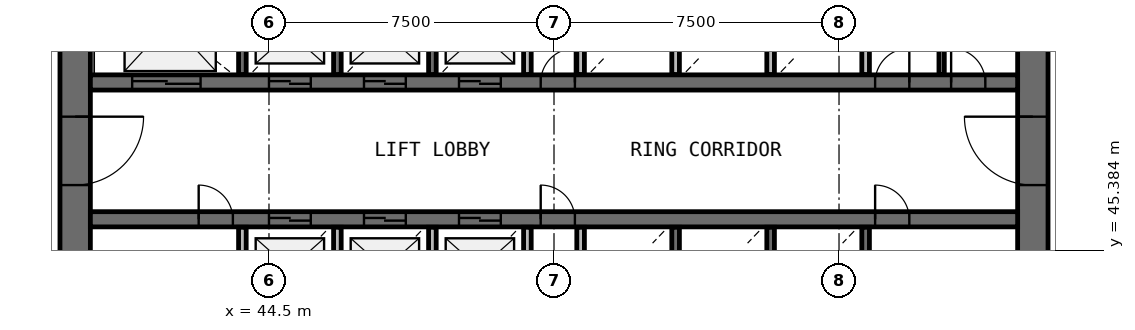
"""IFC4 building model, lengths in metres.
Left out: names, types, materials, properties, quantities, classifications, styles, units other than length and angle.
Written with IfcOpenShell. Run it as: python <this file> out.ifc"""

import sys

from ifc_helpers import new_model, si_unit, direction, frame, frame_2d, origin, place, context, subcontext, project, spatial, rectangle, extrude, source, transform, mapped, element, fill, save


model = new_model("IFC4")
c1 = context("Model", 3, precision=1e-05, world=origin(), true_north=direction((0.0, 1.0)))
c2 = subcontext(c1, "Body", "Model", "MODEL_VIEW")
j1 = project(units=[si_unit("LENGTHUNIT", "METRE"), si_unit("PLANEANGLEUNIT", "RADIAN")], contexts=[c1])
p1 = place(None, origin())
s1 = spatial("IfcSite", under=j1, at=p1, CompositionType="ELEMENT")
p2 = place(p1, origin())
s2 = spatial("IfcBuilding", under=s1, at=p2, CompositionType="ELEMENT")
p3 = place(p2, frame((0.0, 0.0, 112.6)))
s3 = spatial("IfcBuildingStorey", under=s2, at=p3, CompositionType="ELEMENT", Elevation=112.6)
p4 = place(p3, frame((64.6, 38.0, 0.0), z_axis=(0.0, 0.0, 1.0), x_axis=(0.0, 1.0, 0.0)))
e1 = element("IfcWall", 1, at=p4, inside=s3, PredefinedType="SHEAR", context=c2, shape_type="SweptSolid", body=[
    extrude(rectangle(XDim=20.0, YDim=0.8, at=frame_2d((10.0, 0.0))), origin(), (0.0, 0.0, 1.0), 4.1),
])
p5 = place(p4, frame((9.1, 0.0, 0.0)))
e2 = element("IfcOpeningElement", 2, at=p5, cuts=e1, PredefinedType="OPENING", context=c2, shape_type="SweptSolid", body=[
    extrude(rectangle(XDim=1.8, YDim=2.1, at=frame_2d((0.9, 1.05))), frame((0.0, 0.41, 0.0), z_axis=(0.0, -1.0, 0.0), x_axis=(1.0, 0.0, 0.0)), (0.0, 0.0, 1.0), 0.82),
])
p6 = place(p3, frame((39.4, 58.0, 0.0), z_axis=(0.0, 0.0, 1.0), x_axis=(0.0, -1.0, 0.0)))
e3 = element("IfcWall", 3, at=p6, inside=s3, PredefinedType="SHEAR", context=c2, shape_type="SweptSolid", body=[
    extrude(rectangle(XDim=20.0, YDim=0.8, at=frame_2d((10.0, 0.0))), origin(), (0.0, 0.0, 1.0), 4.1),
])
p7 = place(p6, frame((9.1, 0.0, 0.0)))
e4 = element("IfcOpeningElement", 4, at=p7, cuts=e3, PredefinedType="OPENING", context=c2, shape_type="SweptSolid", body=[
    extrude(rectangle(XDim=1.8, YDim=2.1, at=frame_2d((0.9, 1.05))), frame((0.0, 0.41, 0.0), z_axis=(0.0, -1.0, 0.0), x_axis=(1.0, 0.0, 0.0)), (0.0, 0.0, 1.0), 0.82),
])
p8 = place(p3, frame((39.8, 49.8, 0.0), z_axis=(0.0, 0.0, 1.0), x_axis=(1.0, 0.0, 0.0)))
e5 = element("IfcWall", 5, at=p8, inside=s3, PredefinedType="SHEAR", context=c2, shape_type="SweptSolid", body=[
    extrude(rectangle(XDim=24.4, YDim=0.4, at=frame_2d((12.2, 0.0))), origin(), (0.0, 0.0, 1.0), 4.1),
])
p9 = place(p8, frame((4.7, 0.0, 0.0)))
e6 = element("IfcOpeningElement", 6, at=p9, cuts=e5, PredefinedType="OPENING", context=c2, shape_type="SweptSolid", body=[
    extrude(rectangle(XDim=1.1, YDim=2.1, at=frame_2d((0.55, 1.05))), frame((0.0, 0.21, 0.0), z_axis=(0.0, -1.0, 0.0), x_axis=(1.0, 0.0, 0.0)), (0.0, 0.0, 1.0), 0.42),
])
p10 = place(p8, frame((7.2, 0.0, 0.0)))
e7 = element("IfcOpeningElement", 7, at=p10, cuts=e5, PredefinedType="OPENING", context=c2, shape_type="SweptSolid", body=[
    extrude(rectangle(XDim=1.1, YDim=2.1, at=frame_2d((0.55, 1.05))), frame((0.0, 0.21, 0.0), z_axis=(0.0, -1.0, 0.0), x_axis=(1.0, 0.0, 0.0)), (0.0, 0.0, 1.0), 0.42),
])
p11 = place(p8, frame((9.7, 0.0, 0.0)))
e8 = element("IfcOpeningElement", 8, at=p11, cuts=e5, PredefinedType="OPENING", context=c2, shape_type="SweptSolid", body=[
    extrude(rectangle(XDim=1.1, YDim=2.1, at=frame_2d((0.55, 1.05))), frame((0.0, 0.21, 0.0), z_axis=(0.0, -1.0, 0.0), x_axis=(1.0, 0.0, 0.0)), (0.0, 0.0, 1.0), 0.42),
])
p12 = place(p8, frame((1.1, 0.0, 0.0)))
e9 = element("IfcOpeningElement", 9, at=p12, cuts=e5, PredefinedType="OPENING", context=c2, shape_type="SweptSolid", body=[
    extrude(rectangle(XDim=1.8, YDim=2.4, at=frame_2d((0.9, 1.2))), frame((0.0, 0.21, 0.0), z_axis=(0.0, -1.0, 0.0), x_axis=(1.0, 0.0, 0.0)), (0.0, 0.0, 1.0), 0.42),
])
p13 = place(p8, frame((20.65, 0.0, 0.0)))
e10 = element("IfcOpeningElement", 10, at=p13, cuts=e5, PredefinedType="OPENING", context=c2, shape_type="SweptSolid", body=[
    extrude(rectangle(XDim=0.9, YDim=2.1, at=frame_2d((0.45, 1.05))), frame((0.0, 0.21, 0.0), z_axis=(0.0, -1.0, 0.0), x_axis=(1.0, 0.0, 0.0)), (0.0, 0.0, 1.0), 0.42),
])
p14 = place(p8, frame((22.65, 0.0, 0.0)))
e11 = element("IfcOpeningElement", 11, at=p14, cuts=e5, PredefinedType="OPENING", context=c2, shape_type="SweptSolid", body=[
    extrude(rectangle(XDim=0.9, YDim=2.1, at=frame_2d((0.45, 1.05))), frame((0.0, 0.21, 0.0), z_axis=(0.0, -1.0, 0.0), x_axis=(1.0, 0.0, 0.0)), (0.0, 0.0, 1.0), 0.42),
])
p15 = place(p8, frame((11.85, 0.0, 0.0)))
e12 = element("IfcOpeningElement", 12, at=p15, cuts=e5, PredefinedType="OPENING", context=c2, shape_type="SweptSolid", body=[
    extrude(rectangle(XDim=0.9, YDim=2.1, at=frame_2d((0.45, 1.05))), frame((0.0, 0.21, 0.0), z_axis=(0.0, -1.0, 0.0), x_axis=(1.0, 0.0, 0.0)), (0.0, 0.0, 1.0), 0.42),
])
p16 = place(p3, frame((39.8, 46.2, 0.0), z_axis=(0.0, 0.0, 1.0), x_axis=(1.0, 0.0, 0.0)))
e13 = element("IfcWall", 13, at=p16, inside=s3, PredefinedType="SHEAR", context=c2, shape_type="SweptSolid", body=[
    extrude(rectangle(XDim=24.4, YDim=0.4, at=frame_2d((12.2, 0.0))), origin(), (0.0, 0.0, 1.0), 4.1),
])
p17 = place(p16, frame((4.7, 0.0, 0.0)))
e14 = element("IfcOpeningElement", 14, at=p17, cuts=e13, PredefinedType="OPENING", context=c2, shape_type="SweptSolid", body=[
    extrude(rectangle(XDim=1.1, YDim=2.1, at=frame_2d((0.55, 1.05))), frame((0.0, 0.21, 0.0), z_axis=(0.0, -1.0, 0.0), x_axis=(1.0, 0.0, 0.0)), (0.0, 0.0, 1.0), 0.42),
])
p18 = place(p16, frame((7.2, 0.0, 0.0)))
e15 = element("IfcOpeningElement", 15, at=p18, cuts=e13, PredefinedType="OPENING", context=c2, shape_type="SweptSolid", body=[
    extrude(rectangle(XDim=1.1, YDim=2.1, at=frame_2d((0.55, 1.05))), frame((0.0, 0.21, 0.0), z_axis=(0.0, -1.0, 0.0), x_axis=(1.0, 0.0, 0.0)), (0.0, 0.0, 1.0), 0.42),
])
p19 = place(p16, frame((9.7, 0.0, 0.0)))
e16 = element("IfcOpeningElement", 16, at=p19, cuts=e13, PredefinedType="OPENING", context=c2, shape_type="SweptSolid", body=[
    extrude(rectangle(XDim=1.1, YDim=2.1, at=frame_2d((0.55, 1.05))), frame((0.0, 0.21, 0.0), z_axis=(0.0, -1.0, 0.0), x_axis=(1.0, 0.0, 0.0)), (0.0, 0.0, 1.0), 0.42),
])
p20 = place(p16, frame((20.65, 0.0, 0.0)))
e17 = element("IfcOpeningElement", 17, at=p20, cuts=e13, PredefinedType="OPENING", context=c2, shape_type="SweptSolid", body=[
    extrude(rectangle(XDim=0.9, YDim=2.1, at=frame_2d((0.45, 1.05))), frame((0.0, 0.21, 0.0), z_axis=(0.0, -1.0, 0.0), x_axis=(1.0, 0.0, 0.0)), (0.0, 0.0, 1.0), 0.42),
])
p21 = place(p16, frame((2.85, 0.0, 0.0)))
e18 = element("IfcOpeningElement", 18, at=p21, cuts=e13, PredefinedType="OPENING", context=c2, shape_type="SweptSolid", body=[
    extrude(rectangle(XDim=0.9, YDim=2.1, at=frame_2d((0.45, 1.05))), frame((0.0, 0.21, 0.0), z_axis=(0.0, -1.0, 0.0), x_axis=(1.0, 0.0, 0.0)), (0.0, 0.0, 1.0), 0.42),
])
p22 = place(p16, frame((11.85, 0.0, 0.0)))
e19 = element("IfcOpeningElement", 19, at=p22, cuts=e13, PredefinedType="OPENING", context=c2, shape_type="SweptSolid", body=[
    extrude(rectangle(XDim=0.9, YDim=2.1, at=frame_2d((0.45, 1.05))), frame((0.0, 0.21, 0.0), z_axis=(0.0, -1.0, 0.0), x_axis=(1.0, 0.0, 0.0)), (0.0, 0.0, 1.0), 0.42),
])
for number, where, z_axis, x_axis in (
    (20, (43.8, 45.99, 0.0), (0.0, 0.0, 1.0), (0.0, -1.0, 0.0)),
    (21, (43.8, 52.37, 0.0), (0.0, 0.0, 1.0), (0.0, -1.0, 0.0)),
):
    element("IfcWall", number, at=place(p3, frame(where, z_axis=z_axis, x_axis=x_axis)), inside=s3, PredefinedType="SOLIDWALL", context=c2, shape_type="SweptSolid", body=[
        extrude(rectangle(XDim=2.36, YDim=0.2, at=frame_2d((1.18, 0.0))), origin(), (0.0, 0.0, 1.0), 3.7),
    ])
p23 = place(p3, frame((46.3, 43.6, 0.0), z_axis=(0.0, 0.0, 1.0), x_axis=(0.0, 1.0, 0.0)))
e22 = element("IfcWall", 22, at=p23, inside=s3, PredefinedType="SOLIDWALL", context=c2, shape_type="SweptSolid", body=[
    extrude(rectangle(XDim=2.39, YDim=0.2, at=frame_2d((1.195, 0.0))), origin(), (0.0, 0.0, 1.0), 3.7),
])
for number, where, z_axis, x_axis in (
    (23, (46.3, 50.01, 0.0), (0.0, 0.0, 1.0), (0.0, 1.0, 0.0)),
    (24, (48.8, 43.63, 0.0), (0.0, 0.0, 1.0), (0.0, 1.0, 0.0)),
    (25, (48.8, 50.01, 0.0), (0.0, 0.0, 1.0), (0.0, 1.0, 0.0)),
    (26, (51.3, 43.63, 0.0), (0.0, 0.0, 1.0), (0.0, 1.0, 0.0)),
):
    element("IfcWall", number, at=place(p3, frame(where, z_axis=z_axis, x_axis=x_axis)), inside=s3, PredefinedType="SOLIDWALL", context=c2, shape_type="SweptSolid", body=[
        extrude(rectangle(XDim=2.36, YDim=0.2, at=frame_2d((1.18, 0.0))), origin(), (0.0, 0.0, 1.0), 3.7),
    ])
for number, where, z_axis, x_axis in (
    (27, (51.3, 50.01, 0.0), (0.0, 0.0, 1.0), (0.0, 1.0, 0.0)),
    (28, (52.7, 45.99, 0.0), (0.0, 0.0, 1.0), (0.0, -1.0, 0.0)),
):
    element("IfcWall", number, at=place(p3, frame(where, z_axis=z_axis, x_axis=x_axis)), inside=s3, PredefinedType="SOLIDWALL", context=c2, shape_type="SweptSolid", body=[
        extrude(rectangle(XDim=2.39, YDim=0.2, at=frame_2d((1.195, 0.0))), origin(), (0.0, 0.0, 1.0), 3.7),
    ])
for number, where, z_axis, x_axis in (
    (29, (52.7, 52.37, 0.0), (0.0, 0.0, 1.0), (0.0, -1.0, 0.0)),
    (30, (55.2, 43.63, 0.0), (0.0, 0.0, 1.0), (0.0, 1.0, 0.0)),
    (31, (55.2, 50.01, 0.0), (0.0, 0.0, 1.0), (0.0, 1.0, 0.0)),
    (32, (57.7, 43.63, 0.0), (0.0, 0.0, 1.0), (0.0, 1.0, 0.0)),
):
    element("IfcWall", number, at=place(p3, frame(where, z_axis=z_axis, x_axis=x_axis)), inside=s3, PredefinedType="SOLIDWALL", context=c2, shape_type="SweptSolid", body=[
        extrude(rectangle(XDim=2.36, YDim=0.2, at=frame_2d((1.18, 0.0))), origin(), (0.0, 0.0, 1.0), 3.7),
    ])
p24 = place(p3, frame((57.7, 50.01, 0.0), z_axis=(0.0, 0.0, 1.0), x_axis=(0.0, 1.0, 0.0)))
e33 = element("IfcWall", 33, at=p24, inside=s3, PredefinedType="SOLIDWALL", context=c2, shape_type="SweptSolid", body=[
    extrude(rectangle(XDim=2.39, YDim=0.2, at=frame_2d((1.195, 0.0))), origin(), (0.0, 0.0, 1.0), 3.7),
])
for number, where, z_axis, x_axis in (
    (34, (60.2, 43.63, 0.0), (0.0, 0.0, 1.0), (0.0, 1.0, 0.0)),
    (35, (60.2, 50.01, 0.0), (0.0, 0.0, 1.0), (0.0, 1.0, 0.0)),
):
    element("IfcWall", number, at=place(p3, frame(where, z_axis=z_axis, x_axis=x_axis)), inside=s3, PredefinedType="SOLIDWALL", context=c2, shape_type="SweptSolid", body=[
        extrude(rectangle(XDim=2.36, YDim=0.2, at=frame_2d((1.18, 0.0))), origin(), (0.0, 0.0, 1.0), 3.7),
    ])
p25 = place(p3, frame((62.2, 50.01, 0.0), z_axis=(0.0, 0.0, 1.0), x_axis=(0.0, 1.0, 0.0)))
e36 = element("IfcWall", 36, at=p25, inside=s3, PredefinedType="PARTITIONING", context=c2, shape_type="SweptSolid", body=[
    extrude(rectangle(XDim=2.39, YDim=0.14, at=frame_2d((1.195, 0.0))), origin(), (0.0, 0.0, 1.0), 2.9),
])
m1 = source(origin(), c2, "Body", "SweptSolid", [
    extrude(rectangle(XDim=1.8, YDim=2.1, at=frame_2d((0.9, 1.05))), frame((0.0, 0.025, 0.0), z_axis=(0.0, -1.0, 0.0), x_axis=(1.0, 0.0, 0.0)), (0.0, 0.0, 1.0), 0.05),
])
p26 = place(p7, origin())
e37 = element("IfcDoor", 37, at=p26, inside=s3, OperationType="SINGLE_SWING_LEFT", PredefinedType="DOOR", context=c2, shape_type="MappedRepresentation", body=[
    mapped(m1, transform((0.0, 0.0, 0.0), scale=1.0)),
])
fill(e4, e37)
p27 = place(p5, origin())
e38 = element("IfcDoor", 38, at=p27, inside=s3, OperationType="SINGLE_SWING_RIGHT", PredefinedType="DOOR", context=c2, shape_type="MappedRepresentation", body=[
    mapped(m1, transform((0.0, 0.0, 0.0), scale=1.0)),
])
fill(e2, e38)
m2 = source(origin(), c2, "Body", "SweptSolid", [
    extrude(rectangle(XDim=1.1, YDim=2.1, at=frame_2d((0.55, 1.05))), frame((0.0, 0.025, 0.0), z_axis=(0.0, -1.0, 0.0), x_axis=(1.0, 0.0, 0.0)), (0.0, 0.0, 1.0), 0.05),
])
p28 = place(p9, origin())
e39 = element("IfcDoor", 39, at=p28, inside=s3, OperationType="DOUBLE_DOOR_SLIDING", PredefinedType="USERDEFINED", context=c2, shape_type="MappedRepresentation", body=[
    mapped(m2, transform((0.0, 0.0, 0.0), scale=1.0)),
])
fill(e6, e39)
p29 = place(p10, origin())
e40 = element("IfcDoor", 40, at=p29, inside=s3, OperationType="DOUBLE_DOOR_SLIDING", PredefinedType="USERDEFINED", context=c2, shape_type="MappedRepresentation", body=[
    mapped(m2, transform((0.0, 0.0, 0.0), scale=1.0)),
])
fill(e7, e40)
p30 = place(p11, origin())
e41 = element("IfcDoor", 41, at=p30, inside=s3, OperationType="DOUBLE_DOOR_SLIDING", PredefinedType="USERDEFINED", context=c2, shape_type="MappedRepresentation", body=[
    mapped(m2, transform((0.0, 0.0, 0.0), scale=1.0)),
])
fill(e8, e41)
p31 = place(p17, origin())
e42 = element("IfcDoor", 42, at=p31, inside=s3, OperationType="DOUBLE_DOOR_SLIDING", PredefinedType="USERDEFINED", context=c2, shape_type="MappedRepresentation", body=[
    mapped(m2, transform((0.0, 0.0, 0.0), scale=1.0)),
])
fill(e14, e42)
p32 = place(p18, origin())
e43 = element("IfcDoor", 43, at=p32, inside=s3, OperationType="DOUBLE_DOOR_SLIDING", PredefinedType="USERDEFINED", context=c2, shape_type="MappedRepresentation", body=[
    mapped(m2, transform((0.0, 0.0, 0.0), scale=1.0)),
])
fill(e15, e43)
p33 = place(p19, origin())
e44 = element("IfcDoor", 44, at=p33, inside=s3, OperationType="DOUBLE_DOOR_SLIDING", PredefinedType="USERDEFINED", context=c2, shape_type="MappedRepresentation", body=[
    mapped(m2, transform((0.0, 0.0, 0.0), scale=1.0)),
])
fill(e16, e44)
m3 = source(origin(), c2, "Body", "SweptSolid", [
    extrude(rectangle(XDim=1.8, YDim=2.4, at=frame_2d((0.9, 1.2))), frame((0.0, 0.025, 0.0), z_axis=(0.0, -1.0, 0.0), x_axis=(1.0, 0.0, 0.0)), (0.0, 0.0, 1.0), 0.05),
])
p34 = place(p12, origin())
e45 = element("IfcDoor", 45, at=p34, inside=s3, OperationType="DOUBLE_DOOR_SLIDING", PredefinedType="USERDEFINED", context=c2, shape_type="MappedRepresentation", body=[
    mapped(m3, transform((0.0, 0.0, 0.0), scale=1.0)),
])
fill(e9, e45)
m4 = source(origin(), c2, "Body", "SweptSolid", [
    extrude(rectangle(XDim=0.9, YDim=2.1, at=frame_2d((0.45, 1.05))), frame((0.0, 0.025, 0.0), z_axis=(0.0, -1.0, 0.0), x_axis=(1.0, 0.0, 0.0)), (0.0, 0.0, 1.0), 0.05),
])
p35 = place(p20, origin())
e46 = element("IfcDoor", 46, at=p35, inside=s3, OperationType="SINGLE_SWING_LEFT", PredefinedType="DOOR", context=c2, shape_type="MappedRepresentation", body=[
    mapped(m4, transform((0.0, 0.0, 0.0), scale=1.0)),
])
fill(e17, e46)
p36 = place(p13, origin())
e47 = element("IfcDoor", 47, at=p36, inside=s3, OperationType="SINGLE_SWING_RIGHT", PredefinedType="DOOR", context=c2, shape_type="MappedRepresentation", body=[
    mapped(m4, transform((0.0, 0.0, 0.0), scale=1.0)),
])
fill(e10, e47)
p37 = place(p14, origin())
e48 = element("IfcDoor", 48, at=p37, inside=s3, OperationType="SINGLE_SWING_LEFT", PredefinedType="DOOR", context=c2, shape_type="MappedRepresentation", body=[
    mapped(m4, transform((0.0, 0.0, 0.0), scale=1.0)),
])
fill(e11, e48)
p38 = place(p21, origin())
e49 = element("IfcDoor", 49, at=p38, inside=s3, OperationType="SINGLE_SWING_LEFT", PredefinedType="DOOR", context=c2, shape_type="MappedRepresentation", body=[
    mapped(m4, transform((0.0, 0.0, 0.0), scale=1.0)),
])
fill(e18, e49)
p39 = place(p15, origin())
e50 = element("IfcDoor", 50, at=p39, inside=s3, OperationType="SINGLE_SWING_RIGHT", PredefinedType="DOOR", context=c2, shape_type="MappedRepresentation", body=[
    mapped(m4, transform((0.0, 0.0, 0.0), scale=1.0)),
])
fill(e12, e50)
p40 = place(p22, origin())
e51 = element("IfcDoor", 51, at=p40, inside=s3, OperationType="SINGLE_SWING_LEFT", PredefinedType="DOOR", context=c2, shape_type="MappedRepresentation", body=[
    mapped(m4, transform((0.0, 0.0, 0.0), scale=1.0)),
])
fill(e19, e51)
save(model, sys.argv[1])
